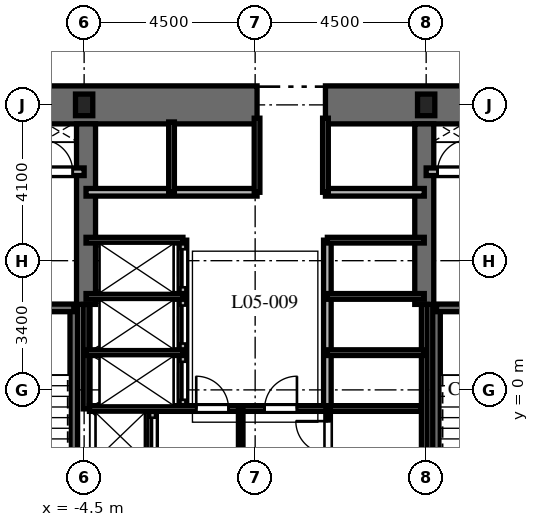
"""IFC4 building model, lengths in metres.
Left out: names, types, materials, properties, quantities, classifications, styles, units other than length and angle.
Written with IfcOpenShell. Run it as: python <this file> out.ifc"""

import sys

from ifc_helpers import new_model, si_unit, direction, frame, frame_2d, origin, origin_2d, place, context, subcontext, project, spatial, rectangle, i_section, extrude, element, fill, save


model = new_model("IFC4")
c1 = context("Model", 3, precision=1e-05, world=origin(), true_north=direction((0.0, 1.0)))
c2 = subcontext(c1, "Body", "Model", "MODEL_VIEW")
j1 = project(units=[si_unit("LENGTHUNIT", "METRE"), si_unit("PLANEANGLEUNIT", "RADIAN")], contexts=[c1])
p1 = place(None, origin())
s1 = spatial("IfcSite", under=j1, at=p1, CompositionType="ELEMENT")
p2 = place(p1, origin())
s2 = spatial("IfcBuilding", under=s1, at=p2, CompositionType="ELEMENT")
p3 = place(p2, frame((0.0, 0.0, 28.2)))
s3 = spatial("IfcBuildingStorey", under=s2, at=p3, CompositionType="ELEMENT", Elevation=28.2)
p4 = place(p3, frame((-9.5, 7.5, 0.0), z_axis=(0.0, 0.0, 1.0), x_axis=(1.0, 0.0, 0.0)))
e1 = element("IfcWall", 1, at=p4, inside=s3, PredefinedType="SHEAR", context=c2, shape_type="SweptSolid", body=[
    extrude(rectangle(XDim=9.55, YDim=1.0, at=frame_2d((4.775, 0.0))), origin(), (0.0, 0.0, 1.0), 6.0),
])
p5 = place(p3, frame((1.85, 7.5, 0.0), z_axis=(0.0, 0.0, 1.0), x_axis=(1.0, 0.0, 0.0)))
e2 = element("IfcWall", 2, at=p5, inside=s3, PredefinedType="SHEAR", context=c2, shape_type="SweptSolid", body=[
    extrude(rectangle(XDim=7.65, YDim=1.0, at=frame_2d((3.825, 0.0))), origin(), (0.0, 0.0, 1.0), 6.0),
])
for number, where, z_axis, x_axis in (
    (3, (-4.45, 2.25, 0.0), (0.0, 0.0, 1.0), (0.0, 1.0, 0.0)),
    (4, (4.45, 2.25, 0.0), (0.0, 0.0, 1.0), (0.0, 1.0, 0.0)),
):
    element("IfcWall", number, at=place(p3, frame(where, z_axis=z_axis, x_axis=x_axis)), inside=s3, PredefinedType="SHEAR", context=c2, shape_type="SweptSolid", body=[
        extrude(rectangle(XDim=4.75, YDim=0.5, at=frame_2d((2.375, 0.0))), origin(), (0.0, 0.0, 1.0), 6.0),
    ])
p6 = place(p3, frame((-4.772, -6.985, 0.0), z_axis=(0.0, 0.0, 1.0), x_axis=(0.0, 1.0, 0.0)))
e5 = element("IfcWall", 5, at=p6, inside=s3, PredefinedType="SHEAR", context=c2, shape_type="SweptSolid", body=[
    extrude(rectangle(XDim=9.143, YDim=0.2, at=frame_2d((4.572, 0.0))), origin(), (0.0, 0.0, 1.0), 6.0),
])
p7 = place(p3, frame((-8.458, 2.158, 0.0), z_axis=(0.0, 0.0, 1.0), x_axis=(1.0, 0.0, 0.0)))
e6 = element("IfcWall", 6, at=p7, inside=s3, PredefinedType="SHEAR", context=c2, shape_type="SweptSolid", body=[
    extrude(rectangle(XDim=3.686, YDim=0.2, at=frame_2d((1.843, 0.0))), origin(), (0.0, 0.0, 1.0), 6.0),
])
p8 = place(p7, frame((1.3, 0.0, 0.0)))
e7 = element("IfcOpeningElement", 7, at=p8, cuts=e6, PredefinedType="OPENING", context=c2, shape_type="SweptSolid", body=[
    extrude(rectangle(XDim=1.0, YDim=2.15, at=frame_2d((0.5, 1.075))), frame((0.0, 0.11, 0.0), z_axis=(0.0, -1.0, 0.0), x_axis=(1.0, 0.0, 0.0)), (0.0, 0.0, 1.0), 0.22),
])
p9 = place(p3, frame((4.772, -6.985, 0.0), z_axis=(0.0, 0.0, 1.0), x_axis=(0.0, 1.0, 0.0)))
e8 = element("IfcWall", 8, at=p9, inside=s3, PredefinedType="SHEAR", context=c2, shape_type="SweptSolid", body=[
    extrude(rectangle(XDim=9.143, YDim=0.2, at=frame_2d((4.572, 0.0))), origin(), (0.0, 0.0, 1.0), 6.0),
])
p10 = place(p3, frame((4.772, 2.158, 0.0), z_axis=(0.0, 0.0, 1.0), x_axis=(1.0, 0.0, 0.0)))
e9 = element("IfcWall", 9, at=p10, inside=s3, PredefinedType="SHEAR", context=c2, shape_type="SweptSolid", body=[
    extrude(rectangle(XDim=3.686, YDim=0.2, at=frame_2d((1.843, 0.0))), origin(), (0.0, 0.0, 1.0), 6.0),
])
p11 = place(p10, frame((1.35, 0.0, 0.0)))
e10 = element("IfcOpeningElement", 10, at=p11, cuts=e9, PredefinedType="OPENING", context=c2, shape_type="SweptSolid", body=[
    extrude(rectangle(XDim=1.0, YDim=2.15, at=frame_2d((0.5, 1.075))), frame((0.0, 0.11, 0.0), z_axis=(0.0, -1.0, 0.0), x_axis=(1.0, 0.0, 0.0)), (0.0, 0.0, 1.0), 0.22),
])
for number, where, z_axis, x_axis in (
    (11, (4.5, 7.5, 0.0), (0.0, 0.0, 1.0), (1.0, 0.0, 0.0)),
    (12, (-4.5, 7.5, 0.0), (0.0, 0.0, 1.0), (1.0, 0.0, 0.0)),
):
    element("IfcColumn", number, at=place(p3, frame(where, z_axis=z_axis, x_axis=x_axis)), inside=s3, PredefinedType="COLUMN", context=c2, shape_type="SweptSolid", body=[
        extrude(i_section(OverallWidth=0.454, OverallDepth=0.569, WebThickness=0.078, FlangeThickness=0.125, at=origin_2d()), origin(), (0.0, 0.0, 1.0), 6.0),
    ])
p12 = place(p3, frame((-8.55, 5.74, 0.0), z_axis=(0.0, 0.0, 1.0), x_axis=(1.0, 0.0, 0.0)))
e13 = element("IfcWall", 13, at=p12, inside=s3, PredefinedType="PARTITIONING", context=c2, shape_type="SweptSolid", body=[
    extrude(rectangle(XDim=4.05, YDim=0.2, at=frame_2d((2.025, 0.0))), origin(), (0.0, 0.0, 1.0), 5.7),
])
p13 = place(p12, frame((0.75, 0.0, 0.0)))
e14 = element("IfcOpeningElement", 14, at=p13, cuts=e13, PredefinedType="OPENING", context=c2, shape_type="SweptSolid", body=[
    extrude(rectangle(XDim=1.1, YDim=2.2, at=frame_2d((0.55, 1.1))), frame((0.0, 0.11, 0.0), z_axis=(0.0, -1.0, 0.0), x_axis=(1.0, 0.0, 0.0)), (0.0, 0.0, 1.0), 0.22),
])
p14 = place(p12, frame((2.9, 0.0, 0.0)))
e15 = element("IfcOpeningElement", 15, at=p14, cuts=e13, PredefinedType="OPENING", context=c2, shape_type="SweptSolid", body=[
    extrude(rectangle(XDim=0.85, YDim=2.03, at=frame_2d((0.425, 1.015))), frame((0.0, 0.11, 0.0), z_axis=(0.0, -1.0, 0.0), x_axis=(1.0, 0.0, 0.0)), (0.0, 0.0, 1.0), 0.22),
])
p15 = place(p3, frame((4.5, 5.74, 0.0), z_axis=(0.0, 0.0, 1.0), x_axis=(1.0, 0.0, 0.0)))
e16 = element("IfcWall", 16, at=p15, inside=s3, PredefinedType="PARTITIONING", context=c2, shape_type="SweptSolid", body=[
    extrude(rectangle(XDim=4.05, YDim=0.2, at=frame_2d((2.025, 0.0))), origin(), (0.0, 0.0, 1.0), 5.7),
])
p16 = place(p15, frame((0.3, 0.0, 0.0)))
e17 = element("IfcOpeningElement", 17, at=p16, cuts=e16, PredefinedType="OPENING", context=c2, shape_type="SweptSolid", body=[
    extrude(rectangle(XDim=0.85, YDim=2.03, at=frame_2d((0.425, 1.015))), frame((0.0, 0.11, 0.0), z_axis=(0.0, -1.0, 0.0), x_axis=(1.0, 0.0, 0.0)), (0.0, 0.0, 1.0), 0.22),
])
p17 = place(p15, frame((2.15, 0.0, 0.0)))
e18 = element("IfcOpeningElement", 18, at=p17, cuts=e16, PredefinedType="OPENING", context=c2, shape_type="SweptSolid", body=[
    extrude(rectangle(XDim=1.1, YDim=2.2, at=frame_2d((0.55, 1.1))), frame((0.0, 0.11, 0.0), z_axis=(0.0, -1.0, 0.0), x_axis=(1.0, 0.0, 0.0)), (0.0, 0.0, 1.0), 0.22),
])
p18 = place(p3, frame((-2.7, -1.972, 0.0), z_axis=(0.0, 0.0, 1.0), x_axis=(0.0, 1.0, 0.0)))
e19 = element("IfcWall", 19, at=p18, inside=s3, PredefinedType="PARTITIONING", context=c2, shape_type="SweptSolid", body=[
    extrude(rectangle(XDim=1.472, YDim=0.2, at=frame_2d((0.736, 0.0))), origin(), (0.0, 0.0, 1.0), 5.7),
])
p19 = place(p18, frame((0.24, 0.0, 0.0)))
e20 = element("IfcOpeningElement", 20, at=p19, cuts=e19, PredefinedType="OPENING", context=c2, shape_type="SweptSolid", body=[
    extrude(rectangle(XDim=1.0, YDim=2.2, at=frame_2d((0.5, 1.1))), frame((0.0, 0.11, 0.0), z_axis=(0.0, -1.0, 0.0), x_axis=(1.0, 0.0, 0.0)), (0.0, 0.0, 1.0), 0.22),
])
p20 = place(p3, frame((-4.45, 5.2, 0.0), z_axis=(0.0, 0.0, 1.0), x_axis=(1.0, 0.0, 0.0)))
e21 = element("IfcWall", 21, at=p20, inside=s3, PredefinedType="PARTITIONING", context=c2, shape_type="SweptSolid", body=[
    extrude(rectangle(XDim=4.5, YDim=0.2, at=frame_2d((2.25, 0.0))), origin(), (0.0, 0.0, 1.0), 5.7),
])
p21 = place(p3, frame((1.85, 5.2, 0.0), z_axis=(0.0, 0.0, 1.0), x_axis=(1.0, 0.0, 0.0)))
e22 = element("IfcWall", 22, at=p21, inside=s3, PredefinedType="PARTITIONING", context=c2, shape_type="SweptSolid", body=[
    extrude(rectangle(XDim=2.6, YDim=0.2, at=frame_2d((1.3, 0.0))), origin(), (0.0, 0.0, 1.0), 5.7),
])
p22 = place(p3, frame((-2.2, 5.2, 0.0), z_axis=(0.0, 0.0, 1.0), x_axis=(0.0, 1.0, 0.0)))
e23 = element("IfcWall", 23, at=p22, inside=s3, PredefinedType="PARTITIONING", context=c2, shape_type="SweptSolid", body=[
    extrude(rectangle(XDim=1.85, YDim=0.15, at=frame_2d((0.925, 0.0))), origin(), (0.0, 0.0, 1.0), 5.7),
])
for number, where, z_axis, x_axis in (
    (24, (0.05, 5.2, 0.0), (0.0, 0.0, 1.0), (0.0, 1.0, 0.0)),
    (25, (1.85, 5.2, 0.0), (0.0, 0.0, 1.0), (0.0, 1.0, 0.0)),
):
    element("IfcWall", number, at=place(p3, frame(where, z_axis=z_axis, x_axis=x_axis)), inside=s3, PredefinedType="PARTITIONING", context=c2, shape_type="SweptSolid", body=[
        extrude(rectangle(XDim=1.95, YDim=0.15, at=frame_2d((0.975, 0.0))), origin(), (0.0, 0.0, 1.0), 5.7),
    ])
p23 = place(p3, frame((-4.45, -0.5, 0.0), z_axis=(0.0, 0.0, 1.0), x_axis=(0.0, 1.0, 0.0)))
e26 = element("IfcWall", 26, at=p23, inside=s3, PredefinedType="PARTITIONING", context=c2, shape_type="SweptSolid", body=[
    extrude(rectangle(XDim=2.75, YDim=0.15, at=frame_2d((1.375, 0.0))), origin(), (0.0, 0.0, 1.0), 5.7),
])
p24 = place(p3, frame((4.45, -1.972, 0.0), z_axis=(0.0, 0.0, 1.0), x_axis=(0.0, 1.0, 0.0)))
e27 = element("IfcWall", 27, at=p24, inside=s3, PredefinedType="PARTITIONING", context=c2, shape_type="SweptSolid", body=[
    extrude(rectangle(XDim=4.222, YDim=0.15, at=frame_2d((2.111, 0.0))), origin(), (0.0, 0.0, 1.0), 5.7),
])
p25 = place(p3, frame((-1.9, -0.5, 0.0), z_axis=(0.0, 0.0, 1.0), x_axis=(0.0, 1.0, 0.0)))
e28 = element("IfcWall", 28, at=p25, inside=s3, PredefinedType="PARTITIONING", context=c2, shape_type="SweptSolid", body=[
    extrude(rectangle(XDim=4.44, YDim=0.2, at=frame_2d((2.22, 0.0))), origin(), (0.0, 0.0, 1.0), 5.7),
])
p26 = place(p25, frame((0.24, 0.0, 0.0)))
e29 = element("IfcOpeningElement", 29, at=p26, cuts=e28, PredefinedType="OPENING", context=c2, shape_type="SweptSolid", body=[
    extrude(rectangle(XDim=1.0, YDim=2.2, at=frame_2d((0.5, 1.1))), frame((0.0, 0.11, 0.0), z_axis=(0.0, -1.0, 0.0), x_axis=(1.0, 0.0, 0.0)), (0.0, 0.0, 1.0), 0.22),
])
p27 = place(p25, frame((1.72, 0.0, 0.0)))
e30 = element("IfcOpeningElement", 30, at=p27, cuts=e28, PredefinedType="OPENING", context=c2, shape_type="SweptSolid", body=[
    extrude(rectangle(XDim=1.0, YDim=2.2, at=frame_2d((0.5, 1.1))), frame((0.0, 0.11, 0.0), z_axis=(0.0, -1.0, 0.0), x_axis=(1.0, 0.0, 0.0)), (0.0, 0.0, 1.0), 0.22),
])
p28 = place(p25, frame((3.2, 0.0, 0.0)))
e31 = element("IfcOpeningElement", 31, at=p28, cuts=e28, PredefinedType="OPENING", context=c2, shape_type="SweptSolid", body=[
    extrude(rectangle(XDim=1.0, YDim=2.2, at=frame_2d((0.5, 1.1))), frame((0.0, 0.11, 0.0), z_axis=(0.0, -1.0, 0.0), x_axis=(1.0, 0.0, 0.0)), (0.0, 0.0, 1.0), 0.22),
])
for number, where, z_axis, x_axis in (
    (32, (-4.45, 3.94, 0.0), (0.0, 0.0, 1.0), (1.0, 0.0, 0.0)),
    (33, (-4.45, 0.98, 0.0), (0.0, 0.0, 1.0), (1.0, 0.0, 0.0)),
    (34, (-4.45, 2.46, 0.0), (0.0, 0.0, 1.0), (1.0, 0.0, 0.0)),
):
    element("IfcWall", number, at=place(p3, frame(where, z_axis=z_axis, x_axis=x_axis)), inside=s3, PredefinedType="PARTITIONING", context=c2, shape_type="SweptSolid", body=[
        extrude(rectangle(XDim=2.55, YDim=0.15, at=frame_2d((1.275, 0.0))), origin(), (0.0, 0.0, 1.0), 5.7),
    ])
p29 = place(p3, frame((1.9, -0.5, 0.0), z_axis=(0.0, 0.0, 1.0), x_axis=(0.0, 1.0, 0.0)))
e35 = element("IfcWall", 35, at=p29, inside=s3, PredefinedType="PARTITIONING", context=c2, shape_type="SweptSolid", body=[
    extrude(rectangle(XDim=4.44, YDim=0.2, at=frame_2d((2.22, 0.0))), origin(), (0.0, 0.0, 1.0), 5.7),
])
for number, where, z_axis, x_axis in (
    (36, (1.9, 3.94, 0.0), (0.0, 0.0, 1.0), (1.0, 0.0, 0.0)),
    (37, (1.9, 0.98, 0.0), (0.0, 0.0, 1.0), (1.0, 0.0, 0.0)),
    (38, (1.9, 2.46, 0.0), (0.0, 0.0, 1.0), (1.0, 0.0, 0.0)),
):
    element("IfcWall", number, at=place(p3, frame(where, z_axis=z_axis, x_axis=x_axis)), inside=s3, PredefinedType="PARTITIONING", context=c2, shape_type="SweptSolid", body=[
        extrude(rectangle(XDim=2.55, YDim=0.15, at=frame_2d((1.275, 0.0))), origin(), (0.0, 0.0, 1.0), 5.7),
    ])
p30 = place(p3, frame((-4.36, -0.49, 0.0), z_axis=(0.0, 0.0, 1.0), x_axis=(1.0, 0.0, 0.0)))
e39 = element("IfcWall", 39, at=p30, inside=s3, PredefinedType="PARTITIONING", context=c2, shape_type="SweptSolid", body=[
    extrude(rectangle(XDim=8.72, YDim=0.15, at=frame_2d((4.36, 0.0))), origin(), (0.0, 0.0, 1.0), 5.7),
])
p31 = place(p30, frame((2.81, 0.0, 0.0)))
e40 = element("IfcOpeningElement", 40, at=p31, cuts=e39, PredefinedType="OPENING", context=c2, shape_type="SweptSolid", body=[
    extrude(rectangle(XDim=0.85, YDim=2.03, at=frame_2d((0.425, 1.015))), frame((0.0, 0.085, 0.0), z_axis=(0.0, -1.0, 0.0), x_axis=(1.0, 0.0, 0.0)), (0.0, 0.0, 1.0), 0.17),
])
p32 = place(p30, frame((4.61, 0.0, 0.0)))
e41 = element("IfcOpeningElement", 41, at=p32, cuts=e39, PredefinedType="OPENING", context=c2, shape_type="SweptSolid", body=[
    extrude(rectangle(XDim=0.85, YDim=2.03, at=frame_2d((0.425, 1.015))), frame((0.0, 0.085, 0.0), z_axis=(0.0, -1.0, 0.0), x_axis=(1.0, 0.0, 0.0)), (0.0, 0.0, 1.0), 0.17),
])
p33 = place(p3, frame((-0.38, -1.972, 0.0), z_axis=(0.0, 0.0, 1.0), x_axis=(0.0, 1.0, 0.0)))
e42 = element("IfcWall", 42, at=p33, inside=s3, PredefinedType="PARTITIONING", context=c2, shape_type="SweptSolid", body=[
    extrude(rectangle(XDim=1.472, YDim=0.12, at=frame_2d((0.736, 0.0))), origin(), (0.0, 0.0, 1.0), 5.7),
])
p34 = place(p3, frame((1.92, -1.972, 0.0), z_axis=(0.0, 0.0, 1.0), x_axis=(0.0, 1.0, 0.0)))
e43 = element("IfcWall", 43, at=p34, inside=s3, PredefinedType="PARTITIONING", context=c2, shape_type="SweptSolid", body=[
    extrude(rectangle(XDim=1.472, YDim=0.12, at=frame_2d((0.736, 0.0))), origin(), (0.0, 0.0, 1.0), 5.7),
])
p35 = place(p34, frame((0.3, 0.0, 0.0)))
e44 = element("IfcOpeningElement", 44, at=p35, cuts=e43, PredefinedType="OPENING", context=c2, shape_type="SweptSolid", body=[
    extrude(rectangle(XDim=0.85, YDim=2.03, at=frame_2d((0.425, 1.015))), frame((0.0, 0.07, 0.0), z_axis=(0.0, -1.0, 0.0), x_axis=(1.0, 0.0, 0.0)), (0.0, 0.0, 1.0), 0.14),
])
p36 = place(p14, origin())
e45 = element("IfcDoor", 45, at=p36, inside=s3, OperationType="SINGLE_SWING_LEFT", PredefinedType="DOOR", context=c2, shape_type="SweptSolid", body=[
    extrude(rectangle(XDim=0.85, YDim=2.03, at=frame_2d((0.425, 1.015))), frame((0.0, 0.025, 0.0), z_axis=(0.0, -1.0, 0.0), x_axis=(1.0, 0.0, 0.0)), (0.0, 0.0, 1.0), 0.05),
])
fill(e15, e45)
p37 = place(p16, origin())
e46 = element("IfcDoor", 46, at=p37, inside=s3, OperationType="SINGLE_SWING_RIGHT", PredefinedType="DOOR", context=c2, shape_type="SweptSolid", body=[
    extrude(rectangle(XDim=0.85, YDim=2.03, at=frame_2d((0.425, 1.015))), frame((0.0, 0.025, 0.0), z_axis=(0.0, -1.0, 0.0), x_axis=(1.0, 0.0, 0.0)), (0.0, 0.0, 1.0), 0.05),
])
fill(e17, e46)
p38 = place(p19, origin())
e47 = element("IfcDoor", 47, at=p38, inside=s3, OperationType="SLIDING_TO_LEFT", PredefinedType="DOOR", context=c2, shape_type="SweptSolid", body=[
    extrude(rectangle(XDim=1.0, YDim=2.2, at=frame_2d((0.5, 1.1))), frame((0.0, 0.025, 0.0), z_axis=(0.0, -1.0, 0.0), x_axis=(1.0, 0.0, 0.0)), (0.0, 0.0, 1.0), 0.05),
])
fill(e20, e47)
p39 = place(p26, origin())
e48 = element("IfcDoor", 48, at=p39, inside=s3, OperationType="SLIDING_TO_LEFT", PredefinedType="DOOR", context=c2, shape_type="SweptSolid", body=[
    extrude(rectangle(XDim=1.0, YDim=2.2, at=frame_2d((0.5, 1.1))), frame((0.0, 0.025, 0.0), z_axis=(0.0, -1.0, 0.0), x_axis=(1.0, 0.0, 0.0)), (0.0, 0.0, 1.0), 0.05),
])
fill(e29, e48)
p40 = place(p27, origin())
e49 = element("IfcDoor", 49, at=p40, inside=s3, OperationType="SLIDING_TO_LEFT", PredefinedType="DOOR", context=c2, shape_type="SweptSolid", body=[
    extrude(rectangle(XDim=1.0, YDim=2.2, at=frame_2d((0.5, 1.1))), frame((0.0, 0.025, 0.0), z_axis=(0.0, -1.0, 0.0), x_axis=(1.0, 0.0, 0.0)), (0.0, 0.0, 1.0), 0.05),
])
fill(e30, e49)
p41 = place(p28, origin())
e50 = element("IfcDoor", 50, at=p41, inside=s3, OperationType="SLIDING_TO_LEFT", PredefinedType="DOOR", context=c2, shape_type="SweptSolid", body=[
    extrude(rectangle(XDim=1.0, YDim=2.2, at=frame_2d((0.5, 1.1))), frame((0.0, 0.025, 0.0), z_axis=(0.0, -1.0, 0.0), x_axis=(1.0, 0.0, 0.0)), (0.0, 0.0, 1.0), 0.05),
])
fill(e31, e50)
p42 = place(p31, origin())
e51 = element("IfcDoor", 51, at=p42, inside=s3, OperationType="SINGLE_SWING_LEFT", PredefinedType="DOOR", context=c2, shape_type="SweptSolid", body=[
    extrude(rectangle(XDim=0.85, YDim=2.03, at=frame_2d((0.425, 1.015))), frame((0.0, 0.025, 0.0), z_axis=(0.0, -1.0, 0.0), x_axis=(1.0, 0.0, 0.0)), (0.0, 0.0, 1.0), 0.05),
])
fill(e40, e51)
p43 = place(p32, origin())
e52 = element("IfcDoor", 52, at=p43, inside=s3, OperationType="SINGLE_SWING_RIGHT", PredefinedType="DOOR", context=c2, shape_type="SweptSolid", body=[
    extrude(rectangle(XDim=0.85, YDim=2.03, at=frame_2d((0.425, 1.015))), frame((0.0, 0.025, 0.0), z_axis=(0.0, -1.0, 0.0), x_axis=(1.0, 0.0, 0.0)), (0.0, 0.0, 1.0), 0.05),
])
fill(e41, e52)
p44 = place(p35, origin())
e53 = element("IfcDoor", 53, at=p44, inside=s3, OperationType="SINGLE_SWING_RIGHT", PredefinedType="DOOR", context=c2, shape_type="SweptSolid", body=[
    extrude(rectangle(XDim=0.85, YDim=2.03, at=frame_2d((0.425, 1.015))), frame((0.0, 0.025, 0.0), z_axis=(0.0, -1.0, 0.0), x_axis=(1.0, 0.0, 0.0)), (0.0, 0.0, 1.0), 0.05),
])
fill(e44, e53)
save(model, sys.argv[1])
